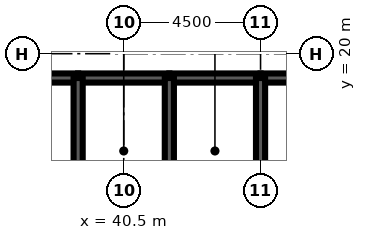
"""IFC4 building model, lengths in metres.
Left out: names, types, materials, properties, quantities, classifications, styles, units other than length and angle.
Written with IfcOpenShell. Run it as: python <this file> out.ifc"""

import sys

from ifc_helpers import new_model, si_unit, direction, frame, frame_2d, origin, place, context, subcontext, project, spatial, rectangle, extrude, element, fill, save


model = new_model("IFC4")
c1 = context("Model", 3, precision=1e-05, world=origin(), true_north=direction((0.0, 1.0)))
c2 = subcontext(c1, "Body", "Model", "MODEL_VIEW")
j1 = project(units=[si_unit("LENGTHUNIT", "METRE"), si_unit("PLANEANGLEUNIT", "RADIAN")], contexts=[c1])
p1 = place(None, origin())
s1 = spatial("IfcSite", under=j1, at=p1, CompositionType="ELEMENT")
p2 = place(p1, origin())
s2 = spatial("IfcBuilding", under=s1, at=p2, CompositionType="ELEMENT")
p3 = place(p2, frame((0.0, 0.0, 248.8)))
s3 = spatial("IfcBuildingStorey", under=s2, at=p3, CompositionType="ELEMENT", Elevation=248.8)
p4 = place(p3, frame((36.0, 19.2, 0.0), z_axis=(0.0, 0.0, 1.0), x_axis=(1.0, 0.0, 0.0)))
e1 = element("IfcWall", 1, at=p4, inside=s3, PredefinedType="SOLIDWALL", context=c2, shape_type="SweptSolid", body=[
    extrude(rectangle(XDim=3.0, YDim=0.3, at=frame_2d((1.5, 0.0))), origin(), (0.0, 0.0, 1.0), 4.2),
])
p5 = place(p4, frame((0.95, 0.0, 0.0)))
e2 = element("IfcOpeningElement", 2, at=p5, cuts=e1, PredefinedType="OPENING", context=c2, shape_type="SweptSolid", body=[
    extrude(rectangle(XDim=1.1, YDim=2.2, at=frame_2d((0.55, 1.1))), frame((0.0, 0.16, 0.0), z_axis=(0.0, -1.0, 0.0), x_axis=(1.0, 0.0, 0.0)), (0.0, 0.0, 1.0), 0.32),
])
p6 = place(p3, frame((39.0, 19.2, 0.0), z_axis=(0.0, 0.0, 1.0), x_axis=(1.0, 0.0, 0.0)))
e3 = element("IfcWall", 3, at=p6, inside=s3, PredefinedType="SOLIDWALL", context=c2, shape_type="SweptSolid", body=[
    extrude(rectangle(XDim=3.0, YDim=0.3, at=frame_2d((1.5, 0.0))), origin(), (0.0, 0.0, 1.0), 4.2),
])
p7 = place(p6, frame((1.0, 0.0, 0.0)))
e4 = element("IfcOpeningElement", 4, at=p7, cuts=e3, PredefinedType="OPENING", context=c2, shape_type="SweptSolid", body=[
    extrude(rectangle(XDim=1.0, YDim=2.1, at=frame_2d((0.5, 1.05))), frame((0.0, 0.16, 0.0), z_axis=(0.0, -1.0, 0.0), x_axis=(1.0, 0.0, 0.0)), (0.0, 0.0, 1.0), 0.32),
])
p8 = place(p3, frame((42.0, 19.2, 0.0), z_axis=(0.0, 0.0, 1.0), x_axis=(1.0, 0.0, 0.0)))
e5 = element("IfcWall", 5, at=p8, inside=s3, PredefinedType="SOLIDWALL", context=c2, shape_type="SweptSolid", body=[
    extrude(rectangle(XDim=3.0, YDim=0.3, at=frame_2d((1.5, 0.0))), origin(), (0.0, 0.0, 1.0), 4.2),
])
p9 = place(p8, frame((1.0, 0.0, 0.0)))
e6 = element("IfcOpeningElement", 6, at=p9, cuts=e5, PredefinedType="OPENING", context=c2, shape_type="SweptSolid", body=[
    extrude(rectangle(XDim=1.0, YDim=2.1, at=frame_2d((0.5, 1.05))), frame((0.0, 0.16, 0.0), z_axis=(0.0, -1.0, 0.0), x_axis=(1.0, 0.0, 0.0)), (0.0, 0.0, 1.0), 0.32),
])
p10 = place(p3, frame((45.0, 19.2, 0.0), z_axis=(0.0, 0.0, 1.0), x_axis=(1.0, 0.0, 0.0)))
e7 = element("IfcWall", 7, at=p10, inside=s3, PredefinedType="SOLIDWALL", context=c2, shape_type="SweptSolid", body=[
    extrude(rectangle(XDim=9.0, YDim=0.3, at=frame_2d((4.5, 0.0))), origin(), (0.0, 0.0, 1.0), 4.2),
])
p11 = place(p10, frame((7.35, 0.0, 0.0)))
e8 = element("IfcOpeningElement", 8, at=p11, cuts=e7, PredefinedType="OPENING", context=c2, shape_type="SweptSolid", body=[
    extrude(rectangle(XDim=1.0, YDim=2.1, at=frame_2d((0.5, 1.05))), frame((0.0, 0.16, 0.0), z_axis=(0.0, -1.0, 0.0), x_axis=(1.0, 0.0, 0.0)), (0.0, 0.0, 1.0), 0.32),
])
for number, where, z_axis, x_axis in (
    (9, (39.0, 16.0, 0.0), (0.0, 0.0, 1.0), (0.0, 1.0, 0.0)),
    (10, (42.0, 16.0, 0.0), (0.0, 0.0, 1.0), (0.0, 1.0, 0.0)),
    (11, (45.0, 16.0, 0.0), (0.0, 0.0, 1.0), (0.0, 1.0, 0.0)),
):
    element("IfcWall", number, at=place(p3, frame(where, z_axis=z_axis, x_axis=x_axis)), inside=s3, PredefinedType="SOLIDWALL", context=c2, shape_type="SweptSolid", body=[
        extrude(rectangle(XDim=3.2, YDim=0.3, at=frame_2d((1.6, 0.0))), origin(), (0.0, 0.0, 1.0), 4.2),
    ])
p12 = place(p3, frame((39.15, 17.35, 0.0), z_axis=(0.0, 0.0, 1.0), x_axis=(1.0, 0.0, 0.0)))
e12 = element("IfcWall", 12, at=p12, inside=s3, PredefinedType="SOLIDWALL", context=c2, shape_type="SweptSolid", body=[
    extrude(rectangle(XDim=2.7, YDim=0.3, at=frame_2d((1.35, 0.0))), origin(), (0.0, 0.0, 1.0), 4.04),
])
p13 = place(p12, frame((0.85, 0.0, 0.0)))
e13 = element("IfcOpeningElement", 13, at=p13, cuts=e12, PredefinedType="OPENING", context=c2, shape_type="SweptSolid", body=[
    extrude(rectangle(XDim=1.0, YDim=2.1, at=frame_2d((0.5, 1.05))), frame((0.0, 0.16, 0.0), z_axis=(0.0, -1.0, 0.0), x_axis=(1.0, 0.0, 0.0)), (0.0, 0.0, 1.0), 0.32),
])
p14 = place(p3, frame((42.15, 17.35, 0.0), z_axis=(0.0, 0.0, 1.0), x_axis=(1.0, 0.0, 0.0)))
e14 = element("IfcWall", 14, at=p14, inside=s3, PredefinedType="SOLIDWALL", context=c2, shape_type="SweptSolid", body=[
    extrude(rectangle(XDim=2.7, YDim=0.3, at=frame_2d((1.35, 0.0))), origin(), (0.0, 0.0, 1.0), 4.04),
])
p15 = place(p14, frame((0.85, 0.0, 0.0)))
e15 = element("IfcOpeningElement", 15, at=p15, cuts=e14, PredefinedType="OPENING", context=c2, shape_type="SweptSolid", body=[
    extrude(rectangle(XDim=1.0, YDim=2.1, at=frame_2d((0.5, 1.05))), frame((0.0, 0.16, 0.0), z_axis=(0.0, -1.0, 0.0), x_axis=(1.0, 0.0, 0.0)), (0.0, 0.0, 1.0), 0.32),
])
p16 = place(p13, origin())
e16 = element("IfcDoor", 16, at=p16, inside=s3, OperationType="SINGLE_SWING_LEFT", PredefinedType="DOOR", context=c2, shape_type="SweptSolid", body=[
    extrude(rectangle(XDim=1.0, YDim=2.1, at=frame_2d((0.5, 1.05))), frame((0.0, 0.025, 0.0), z_axis=(0.0, -1.0, 0.0), x_axis=(1.0, 0.0, 0.0)), (0.0, 0.0, 1.0), 0.05),
])
fill(e13, e16)
p17 = place(p15, origin())
e17 = element("IfcDoor", 17, at=p17, inside=s3, OperationType="SINGLE_SWING_LEFT", PredefinedType="DOOR", context=c2, shape_type="SweptSolid", body=[
    extrude(rectangle(XDim=1.0, YDim=2.1, at=frame_2d((0.5, 1.05))), frame((0.0, 0.025, 0.0), z_axis=(0.0, -1.0, 0.0), x_axis=(1.0, 0.0, 0.0)), (0.0, 0.0, 1.0), 0.05),
])
fill(e15, e17)
p18 = place(p7, origin())
e18 = element("IfcDoor", 18, at=p18, inside=s3, OperationType="SINGLE_SWING_LEFT", PredefinedType="DOOR", context=c2, shape_type="SweptSolid", body=[
    extrude(rectangle(XDim=1.0, YDim=2.1, at=frame_2d((0.5, 1.05))), frame((0.0, 0.025, 0.0), z_axis=(0.0, -1.0, 0.0), x_axis=(1.0, 0.0, 0.0)), (0.0, 0.0, 1.0), 0.05),
])
fill(e4, e18)
p19 = place(p9, origin())
e19 = element("IfcDoor", 19, at=p19, inside=s3, OperationType="SINGLE_SWING_LEFT", PredefinedType="DOOR", context=c2, shape_type="SweptSolid", body=[
    extrude(rectangle(XDim=1.0, YDim=2.1, at=frame_2d((0.5, 1.05))), frame((0.0, 0.025, 0.0), z_axis=(0.0, -1.0, 0.0), x_axis=(1.0, 0.0, 0.0)), (0.0, 0.0, 1.0), 0.05),
])
fill(e6, e19)
save(model, sys.argv[1])
